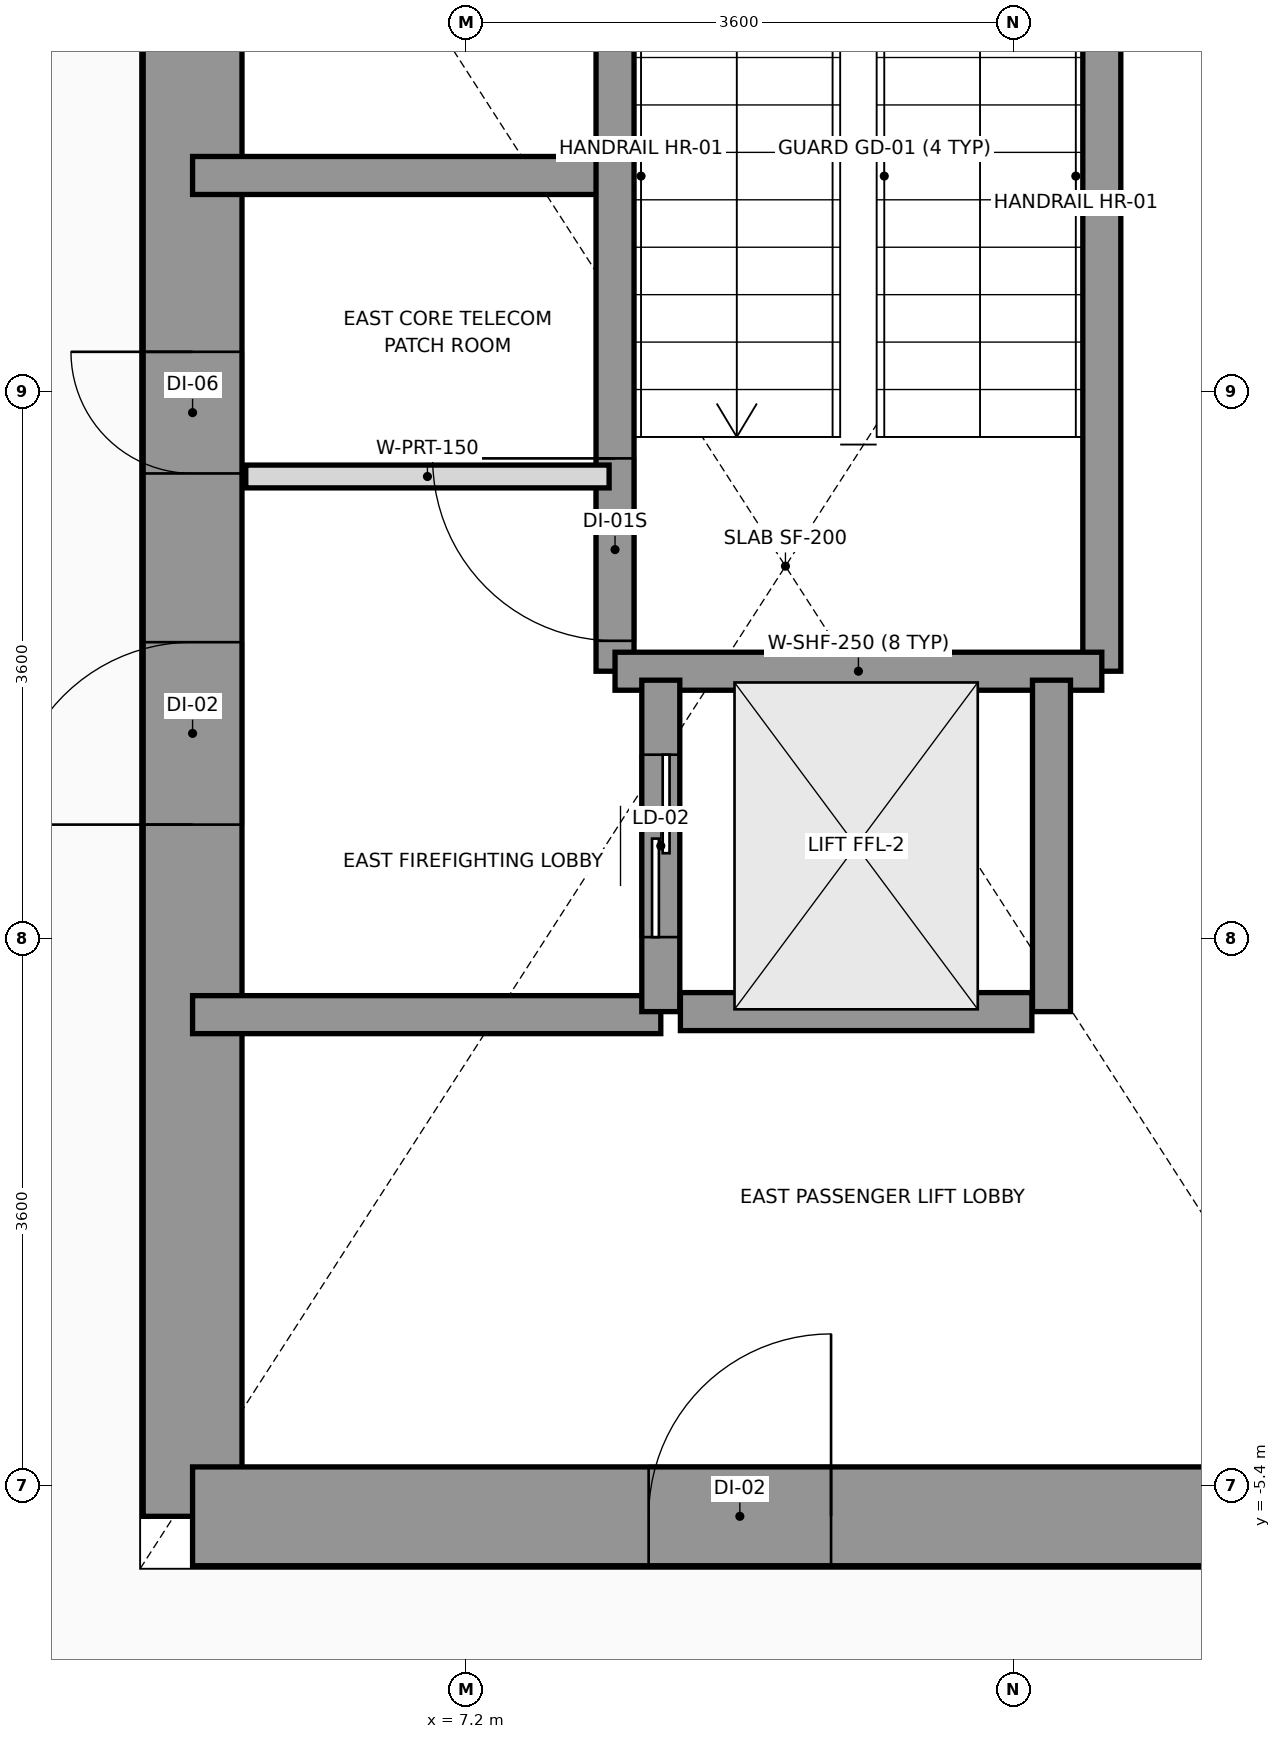
"""IFC4 building model, lengths in metres.
Left out: names, types, materials, properties, quantities, classifications, styles, units other than length and angle.
Written with IfcOpenShell. Run it as: python <this file> out.ifc"""

import sys

from ifc_helpers import new_model, si_unit, direction, frame, frame_2d, origin, place, context, subcontext, project, spatial, rectangle, extrude, source, transform, mapped, element, fill, save


model = new_model("IFC4")
c1 = context("Model", 3, precision=1e-05, world=origin(), true_north=direction((0.0, 1.0)))
c2 = subcontext(c1, "Body", "Model", "MODEL_VIEW")
j1 = project(units=[si_unit("LENGTHUNIT", "METRE"), si_unit("PLANEANGLEUNIT", "RADIAN")], contexts=[c1])
p1 = place(None, origin())
s1 = spatial("IfcSite", under=j1, at=p1, CompositionType="ELEMENT")
p2 = place(p1, origin())
s2 = spatial("IfcBuilding", under=s1, at=p2, CompositionType="ELEMENT")
p3 = place(p2, frame((0.0, 0.0, -8.4)))
s3 = spatial("IfcBuildingStorey", under=s2, at=p3, CompositionType="ELEMENT", Elevation=-8.4)
p4 = place(p3, frame((5.4, -5.6, -0.2), z_axis=(0.0, 0.0, 1.0), x_axis=(0.0, 1.0, 0.0)))
e1 = element("IfcWall", 1, at=p4, inside=s3, PredefinedType="SHEAR", context=c2, shape_type="SweptSolid", body=[
    extrude(rectangle(XDim=12.5, YDim=0.65, at=frame_2d((6.25, 0.0))), origin(), (0.0, 0.0, 1.0), 4.12),
])
p5 = place(p4, frame((4.55, 0.0, 0.2)))
e2 = element("IfcOpeningElement", 2, at=p5, cuts=e1, PredefinedType="OPENING", context=c2, shape_type="SweptSolid", body=[
    extrude(rectangle(XDim=1.2, YDim=2.2, at=frame_2d((0.6, 1.1))), frame((0.0, 0.335, 0.0), z_axis=(0.0, -1.0, 0.0), x_axis=(1.0, 0.0, 0.0)), (0.0, 0.0, 1.0), 0.67),
])
p6 = place(p4, frame((6.86, 0.0, 0.2)))
e3 = element("IfcOpeningElement", 3, at=p6, cuts=e1, PredefinedType="OPENING", context=c2, shape_type="SweptSolid", body=[
    extrude(rectangle(XDim=0.8, YDim=2.1, at=frame_2d((0.4, 1.05))), frame((0.0, 0.335, 0.0), z_axis=(0.0, -1.0, 0.0), x_axis=(1.0, 0.0, 0.0)), (0.0, 0.0, 1.0), 0.67),
])
p7 = place(p3, frame((5.4, -5.6, -0.2), z_axis=(0.0, 0.0, 1.0), x_axis=(1.0, 0.0, 0.0)))
e4 = element("IfcWall", 4, at=p7, inside=s3, PredefinedType="SHEAR", context=c2, shape_type="SweptSolid", body=[
    extrude(rectangle(XDim=7.8, YDim=0.65, at=frame_2d((3.9, 0.0))), origin(), (0.0, 0.0, 1.0), 4.12),
])
p8 = place(p7, frame((3.0, 0.0, 0.2)))
e5 = element("IfcOpeningElement", 5, at=p8, cuts=e4, PredefinedType="OPENING", context=c2, shape_type="SweptSolid", body=[
    extrude(rectangle(XDim=1.2, YDim=2.2, at=frame_2d((0.6, 1.1))), frame((0.0, 0.335, 0.0), z_axis=(0.0, -1.0, 0.0), x_axis=(1.0, 0.0, 0.0)), (0.0, 0.0, 1.0), 0.67),
])
p9 = place(p3, frame((5.4, 3.22, -0.2), z_axis=(0.0, 0.0, 1.0), x_axis=(1.0, 0.0, 0.0)))
e6 = element("IfcWall", 6, at=p9, inside=s3, PredefinedType="SOLIDWALL", context=c2, shape_type="SweptSolid", body=[
    extrude(rectangle(XDim=2.78, YDim=0.25, at=frame_2d((1.39, 0.0))), origin(), (0.0, 0.0, 1.0), 4.12),
])
p10 = place(p3, frame((5.4, -2.3, -0.2), z_axis=(0.0, 0.0, 1.0), x_axis=(1.0, 0.0, 0.0)))
e7 = element("IfcWall", 7, at=p10, inside=s3, PredefinedType="SOLIDWALL", context=c2, shape_type="SweptSolid", body=[
    extrude(rectangle(XDim=3.08, YDim=0.25, at=frame_2d((1.54, 0.0))), origin(), (0.0, 0.0, 1.0), 4.12),
])
p11 = place(p3, frame((8.179, -0.041, -0.2), z_axis=(0.0, 0.0, 1.0), x_axis=(0.0, 1.0, 0.0)))
e8 = element("IfcWall", 8, at=p11, inside=s3, PredefinedType="SOLIDWALL", context=c2, shape_type="SweptSolid", body=[
    extrude(rectangle(XDim=6.941, YDim=0.25, at=frame_2d((3.47, 0.0))), origin(), (0.0, 0.0, 1.0), 4.12),
])
p12 = place(p11, frame((0.2, 0.0, 0.2)))
e9 = element("IfcOpeningElement", 9, at=p12, cuts=e8, PredefinedType="OPENING", context=c2, shape_type="SweptSolid", body=[
    extrude(rectangle(XDim=1.2, YDim=2.2, at=frame_2d((0.6, 1.1))), frame((0.0, 0.135, 0.0), z_axis=(0.0, -1.0, 0.0), x_axis=(1.0, 0.0, 0.0)), (0.0, 0.0, 1.0), 0.27),
])
p13 = place(p3, frame((11.381, -0.041, -0.2), z_axis=(0.0, 0.0, 1.0), x_axis=(0.0, 1.0, 0.0)))
e10 = element("IfcWall", 10, at=p13, inside=s3, PredefinedType="SOLIDWALL", context=c2, shape_type="SweptSolid", body=[
    extrude(rectangle(XDim=6.941, YDim=0.25, at=frame_2d((3.47, 0.0))), origin(), (0.0, 0.0, 1.0), 4.12),
])
p14 = place(p3, frame((8.179, -0.041, -0.2), z_axis=(0.0, 0.0, 1.0), x_axis=(1.0, 0.0, 0.0)))
e11 = element("IfcWall", 11, at=p14, inside=s3, PredefinedType="SOLIDWALL", context=c2, shape_type="SweptSolid", body=[
    extrude(rectangle(XDim=3.202, YDim=0.25, at=frame_2d((1.601, 0.0))), origin(), (0.0, 0.0, 1.0), 4.12),
])
p15 = place(p3, frame((8.48, -2.28, -0.2), z_axis=(0.0, 0.0, 1.0), x_axis=(0.0, 1.0, 0.0)))
e12 = element("IfcWall", 12, at=p15, inside=s3, PredefinedType="SOLIDWALL", context=c2, shape_type="SweptSolid", body=[
    extrude(rectangle(XDim=2.18, YDim=0.25, at=frame_2d((1.09, 0.0))), origin(), (0.0, 0.0, 1.0), 4.12),
])
p16 = place(p15, frame((0.49, 0.0, 0.2)))
e13 = element("IfcOpeningElement", 13, at=p16, cuts=e12, PredefinedType="OPENING", context=c2, shape_type="SweptSolid", body=[
    extrude(rectangle(XDim=1.2, YDim=2.2, at=frame_2d((0.6, 1.1))), frame((0.0, 0.135, 0.0), z_axis=(0.0, -1.0, 0.0), x_axis=(1.0, 0.0, 0.0)), (0.0, 0.0, 1.0), 0.27),
])
p17 = place(p3, frame((11.05, -2.28, -0.2), z_axis=(0.0, 0.0, 1.0), x_axis=(0.0, 1.0, 0.0)))
e14 = element("IfcWall", 14, at=p17, inside=s3, PredefinedType="SOLIDWALL", context=c2, shape_type="SweptSolid", body=[
    extrude(rectangle(XDim=2.18, YDim=0.25, at=frame_2d((1.09, 0.0))), origin(), (0.0, 0.0, 1.0), 4.12),
])
p18 = place(p3, frame((8.609, -2.28, -0.2), z_axis=(0.0, 0.0, 1.0), x_axis=(1.0, 0.0, 0.0)))
e15 = element("IfcWall", 15, at=p18, inside=s3, PredefinedType="SOLIDWALL", context=c2, shape_type="SweptSolid", body=[
    extrude(rectangle(XDim=2.312, YDim=0.25, at=frame_2d((1.156, 0.0))), origin(), (0.0, 0.0, 1.0), 4.12),
])
p19 = place(p3, frame((5.75, 1.24, 0.0), z_axis=(0.0, 0.0, 1.0), x_axis=(1.0, 0.0, 0.0)))
e16 = element("IfcWall", 16, at=p19, inside=s3, PredefinedType="PARTITIONING", context=c2, shape_type="SweptSolid", body=[
    extrude(rectangle(XDim=2.39, YDim=0.15, at=frame_2d((1.195, 0.0))), origin(), (0.0, 0.0, 1.0), 3.02),
])
m1 = source(origin(), c2, "Body", "SweptSolid", [
    extrude(rectangle(XDim=1.2, YDim=2.2, at=frame_2d((0.6, 1.1))), frame((0.0, 0.025, 0.0), z_axis=(0.0, -1.0, 0.0), x_axis=(1.0, 0.0, 0.0)), (0.0, 0.0, 1.0), 0.05),
])
p20 = place(p12, origin())
e17 = element("IfcDoor", 17, at=p20, inside=s3, OperationType="SINGLE_SWING_RIGHT", PredefinedType="DOOR", context=c2, shape_type="MappedRepresentation", body=[
    mapped(m1, transform((0.0, 0.0, 0.0), x_axis=(1.0, 0.0, 0.0), y_axis=(0.0, 1.0, 0.0), z_axis=(0.0, 0.0, 1.0), scale=1.0)),
])
fill(e9, e17)
p21 = place(p5, origin())
e18 = element("IfcDoor", 18, at=p21, inside=s3, OperationType="SINGLE_SWING_LEFT", PredefinedType="DOOR", context=c2, shape_type="MappedRepresentation", body=[
    mapped(m1, transform((0.0, 0.0, 0.0), x_axis=(1.0, 0.0, 0.0), y_axis=(0.0, 1.0, 0.0), z_axis=(0.0, 0.0, 1.0), scale=1.0)),
])
fill(e2, e18)
p22 = place(p8, origin())
e19 = element("IfcDoor", 19, at=p22, inside=s3, OperationType="SINGLE_SWING_RIGHT", PredefinedType="DOOR", context=c2, shape_type="MappedRepresentation", body=[
    mapped(m1, transform((0.0, 0.0, 0.0), x_axis=(1.0, 0.0, 0.0), y_axis=(0.0, 1.0, 0.0), z_axis=(0.0, 0.0, 1.0), scale=1.0)),
])
fill(e5, e19)
m2 = source(origin(), c2, "Body", "SweptSolid", [
    extrude(rectangle(XDim=0.8, YDim=2.1, at=frame_2d((0.4, 1.05))), frame((0.0, 0.025, 0.0), z_axis=(0.0, -1.0, 0.0), x_axis=(1.0, 0.0, 0.0)), (0.0, 0.0, 1.0), 0.05),
])
p23 = place(p6, origin())
e20 = element("IfcDoor", 20, at=p23, inside=s3, OperationType="SINGLE_SWING_RIGHT", PredefinedType="DOOR", context=c2, shape_type="MappedRepresentation", body=[
    mapped(m2, transform((0.0, 0.0, 0.0), x_axis=(1.0, 0.0, 0.0), y_axis=(0.0, 1.0, 0.0), z_axis=(0.0, 0.0, 1.0), scale=1.0)),
])
fill(e3, e20)
p24 = place(p16, origin())
e21 = element("IfcDoor", 21, at=p24, inside=s3, OperationType="SLIDING_TO_RIGHT", PredefinedType="DOOR", context=c2, shape_type="MappedRepresentation", body=[
    mapped(m1, transform((0.0, 0.0, 0.0), x_axis=(1.0, 0.0, 0.0), y_axis=(0.0, 1.0, 0.0), z_axis=(0.0, 0.0, 1.0), scale=1.0)),
])
fill(e13, e21)
save(model, sys.argv[1])
